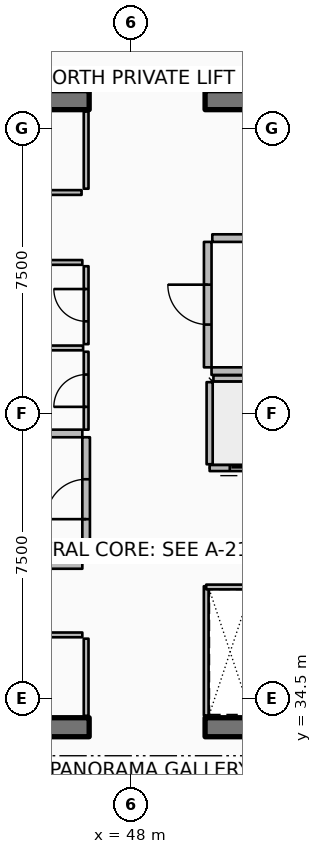
"""IFC4 building model, lengths in metres.
Left out: names, types, materials, properties, quantities, classifications, styles, units other than length and angle.
Written with IfcOpenShell. Run it as: python <this file> out.ifc"""

import sys

from ifc_helpers import new_model, si_unit, direction, frame, frame_2d, origin, place, context, subcontext, project, spatial, rectangle, extrude, element, fill, save


model = new_model("IFC4")
c1 = context("Model", 3, precision=1e-05, world=origin(), true_north=direction((0.0, 1.0)))
c2 = subcontext(c1, "Body", "Model", "MODEL_VIEW")
j1 = project(units=[si_unit("LENGTHUNIT", "METRE"), si_unit("PLANEANGLEUNIT", "RADIAN")], contexts=[c1])
p1 = place(None, origin())
s1 = spatial("IfcSite", under=j1, at=p1, CompositionType="ELEMENT")
p2 = place(p1, origin())
s2 = spatial("IfcBuilding", under=s1, at=p2, CompositionType="ELEMENT")
p3 = place(p2, frame((0.0, 0.0, 317.9)))
s3 = spatial("IfcBuildingStorey", under=s2, at=p3, CompositionType="ELEMENT", Elevation=317.9)
p4 = place(p3, frame((37.3, 33.75, 0.0), z_axis=(0.0, 0.0, 1.0), x_axis=(1.0, 0.0, 0.0)))
e1 = element("IfcWall", 1, at=p4, inside=s3, PredefinedType="SHEAR", context=c2, shape_type="SweptSolid", body=[
    extrude(rectangle(XDim=9.6, YDim=0.5, at=frame_2d((4.8, 0.0))), origin(), (0.0, 0.0, 1.0), 4.2),
])
p5 = place(p3, frame((49.95, 33.75, 0.0), z_axis=(0.0, 0.0, 1.0), x_axis=(1.0, 0.0, 0.0)))
e2 = element("IfcWall", 2, at=p5, inside=s3, PredefinedType="SHEAR", context=c2, shape_type="SweptSolid", body=[
    extrude(rectangle(XDim=9.6, YDim=0.5, at=frame_2d((4.8, 0.0))), origin(), (0.0, 0.0, 1.0), 4.2),
])
p6 = place(p3, frame((37.3, 50.25, 0.0), z_axis=(0.0, 0.0, 1.0), x_axis=(1.0, 0.0, 0.0)))
e3 = element("IfcWall", 3, at=p6, inside=s3, PredefinedType="SHEAR", context=c2, shape_type="SweptSolid", body=[
    extrude(rectangle(XDim=9.6, YDim=0.5, at=frame_2d((4.8, 0.0))), origin(), (0.0, 0.0, 1.0), 4.2),
])
p7 = place(p3, frame((49.95, 50.25, 0.0), z_axis=(0.0, 0.0, 1.0), x_axis=(1.0, 0.0, 0.0)))
e4 = element("IfcWall", 4, at=p7, inside=s3, PredefinedType="SHEAR", context=c2, shape_type="SweptSolid", body=[
    extrude(rectangle(XDim=9.6, YDim=0.5, at=frame_2d((4.8, 0.0))), origin(), (0.0, 0.0, 1.0), 4.2),
])
p8 = place(p3, frame((52.23, 40.57, 0.0), z_axis=(0.0, 0.0, 1.0), x_axis=(-1.0, 0.0, 0.0)))
e5 = element("IfcWall", 5, at=p8, inside=s3, PredefinedType="PARTITIONING", context=c2, shape_type="SweptSolid", body=[
    extrude(rectangle(XDim=2.16, YDim=0.16, at=frame_2d((1.08, 0.0))), origin(), (0.0, 0.0, 1.0), 3.94),
])
p9 = place(p8, frame((0.53, 0.0, 0.0)))
e6 = element("IfcOpeningElement", 6, at=p9, cuts=e5, PredefinedType="OPENING", context=c2, shape_type="SweptSolid", body=[
    extrude(rectangle(XDim=1.1, YDim=2.1, at=frame_2d((0.55, 1.05))), frame((0.0, 0.09, 0.0), z_axis=(0.0, -1.0, 0.0), x_axis=(1.0, 0.0, 0.0)), (0.0, 0.0, 1.0), 0.18),
])
p10 = place(p3, frame((50.07, 40.67, 0.0), z_axis=(0.0, 0.0, 1.0), x_axis=(0.0, 1.0, 0.0)))
e7 = element("IfcWall", 7, at=p10, inside=s3, PredefinedType="PARTITIONING", context=c2, shape_type="SweptSolid", body=[
    extrude(rectangle(XDim=2.16, YDim=0.16, at=frame_2d((1.08, 0.0))), origin(), (0.0, 0.0, 1.0), 3.94),
])
p11 = place(p3, frame((50.17, 42.93, 0.0), z_axis=(0.0, 0.0, 1.0), x_axis=(1.0, 0.0, 0.0)))
e8 = element("IfcWall", 8, at=p11, inside=s3, PredefinedType="PARTITIONING", context=c2, shape_type="SweptSolid", body=[
    extrude(rectangle(XDim=1.96, YDim=0.16, at=frame_2d((0.98, 0.0))), origin(), (0.0, 0.0, 1.0), 3.94),
])
p12 = place(p3, frame((46.82, 34.05, 0.0), z_axis=(0.0, 0.0, 1.0), x_axis=(0.0, 1.0, 0.0)))
e9 = element("IfcWall", 9, at=p12, inside=s3, PredefinedType="PARTITIONING", context=c2, shape_type="SweptSolid", body=[
    extrude(rectangle(XDim=2.03, YDim=0.125, at=frame_2d((1.015, 0.0))), origin(), (0.0, 0.0, 1.0), 3.38),
])
p13 = place(p3, frame((37.92, 36.18, 0.0), z_axis=(0.0, 0.0, 1.0), x_axis=(1.0, 0.0, 0.0)))
e10 = element("IfcWall", 10, at=p13, inside=s3, PredefinedType="PARTITIONING", context=c2, shape_type="SweptSolid", body=[
    extrude(rectangle(XDim=8.8, YDim=0.125, at=frame_2d((4.4, 0.0))), origin(), (0.0, 0.0, 1.0), 3.38),
])
p14 = place(p13, frame((3.975, 0.0, 0.0)))
e11 = element("IfcOpeningElement", 11, at=p14, cuts=e10, PredefinedType="OPENING", context=c2, shape_type="SweptSolid", body=[
    extrude(rectangle(XDim=0.85, YDim=2.06, at=frame_2d((0.425, 1.03))), frame((0.0, 0.073, 0.0), z_axis=(0.0, -1.0, 0.0), x_axis=(1.0, 0.0, 0.0)), (0.0, 0.0, 1.0), 0.145),
])
p15 = place(p3, frame((46.82, 47.92, 0.0), z_axis=(0.0, 0.0, 1.0), x_axis=(0.0, 1.0, 0.0)))
e12 = element("IfcWall", 12, at=p15, inside=s3, PredefinedType="PARTITIONING", context=c2, shape_type="SweptSolid", body=[
    extrude(rectangle(XDim=2.03, YDim=0.125, at=frame_2d((1.015, 0.0))), origin(), (0.0, 0.0, 1.0), 3.38),
])
p16 = place(p3, frame((42.2, 47.82, 0.0), z_axis=(0.0, 0.0, 1.0), x_axis=(1.0, 0.0, 0.0)))
e13 = element("IfcWall", 13, at=p16, inside=s3, PredefinedType="PARTITIONING", context=c2, shape_type="SweptSolid", body=[
    extrude(rectangle(XDim=4.5, YDim=0.125, at=frame_2d((2.25, 0.0))), origin(), (0.0, 0.0, 1.0), 3.38),
])
p17 = place(p16, frame((1.825, 0.0, 0.0)))
e14 = element("IfcOpeningElement", 14, at=p17, cuts=e13, PredefinedType="OPENING", context=c2, shape_type="SweptSolid", body=[
    extrude(rectangle(XDim=0.85, YDim=2.06, at=frame_2d((0.425, 1.03))), frame((0.0, 0.073, 0.0), z_axis=(0.0, -1.0, 0.0), x_axis=(1.0, 0.0, 0.0)), (0.0, 0.0, 1.0), 0.145),
])
p18 = place(p3, frame((41.35, 38.02, 0.0), z_axis=(0.0, 0.0, 1.0), x_axis=(1.0, 0.0, 0.0)))
e15 = element("IfcWall", 15, at=p18, inside=s3, PredefinedType="PARTITIONING", context=c2, shape_type="SweptSolid", body=[
    extrude(rectangle(XDim=5.37, YDim=0.2, at=frame_2d((2.685, 0.0))), origin(), (0.0, 0.0, 1.0), 3.94),
])
p19 = place(p3, frame((43.92, 41.48, 0.0), z_axis=(0.0, 0.0, 1.0), x_axis=(1.0, 0.0, 0.0)))
e16 = element("IfcWall", 16, at=p19, inside=s3, PredefinedType="PARTITIONING", context=c2, shape_type="SweptSolid", body=[
    extrude(rectangle(XDim=2.8, YDim=0.2, at=frame_2d((1.4, 0.0))), origin(), (0.0, 0.0, 1.0), 3.94),
])
p20 = place(p3, frame((46.82, 38.12, 0.0), z_axis=(0.0, 0.0, 1.0), x_axis=(0.0, 1.0, 0.0)))
e17 = element("IfcWall", 17, at=p20, inside=s3, PredefinedType="PARTITIONING", context=c2, shape_type="SweptSolid", body=[
    extrude(rectangle(XDim=3.26, YDim=0.2, at=frame_2d((1.63, 0.0))), origin(), (0.0, 0.0, 1.0), 3.94),
])
p21 = place(p20, frame((1.105, 0.0, 0.0)))
e18 = element("IfcOpeningElement", 18, at=p21, cuts=e17, PredefinedType="OPENING", context=c2, shape_type="SweptSolid", body=[
    extrude(rectangle(XDim=1.05, YDim=2.1, at=frame_2d((0.525, 1.05))), frame((0.0, 0.11, 0.0), z_axis=(0.0, -1.0, 0.0), x_axis=(1.0, 0.0, 0.0)), (0.0, 0.0, 1.0), 0.22),
])
p22 = place(p3, frame((50.12, 43.12, 0.0), z_axis=(0.0, 0.0, 1.0), x_axis=(1.0, 0.0, 0.0)))
e19 = element("IfcWall", 19, at=p22, inside=s3, PredefinedType="PARTITIONING", context=c2, shape_type="SweptSolid", body=[
    extrude(rectangle(XDim=8.88, YDim=0.2, at=frame_2d((4.44, 0.0))), origin(), (0.0, 0.0, 1.0), 3.94),
])
p23 = place(p3, frame((50.14, 46.62, 0.0), z_axis=(0.0, 0.0, 1.0), x_axis=(1.0, 0.0, 0.0)))
e20 = element("IfcWall", 20, at=p23, inside=s3, PredefinedType="PARTITIONING", context=c2, shape_type="SweptSolid", body=[
    extrude(rectangle(XDim=1.02, YDim=0.2, at=frame_2d((0.51, 0.0))), origin(), (0.0, 0.0, 1.0), 3.94),
])
p24 = place(p3, frame((50.02, 43.22, 0.0), z_axis=(0.0, 0.0, 1.0), x_axis=(0.0, 1.0, 0.0)))
e21 = element("IfcWall", 21, at=p24, inside=s3, PredefinedType="PARTITIONING", context=c2, shape_type="SweptSolid", body=[
    extrude(rectangle(XDim=3.3, YDim=0.2, at=frame_2d((1.65, 0.0))), origin(), (0.0, 0.0, 1.0), 3.94),
])
p25 = place(p24, frame((1.125, 0.0, 0.0)))
e22 = element("IfcOpeningElement", 22, at=p25, cuts=e21, PredefinedType="OPENING", context=c2, shape_type="SweptSolid", body=[
    extrude(rectangle(XDim=1.05, YDim=2.1, at=frame_2d((0.525, 1.05))), frame((0.0, 0.11, 0.0), z_axis=(0.0, -1.0, 0.0), x_axis=(1.0, 0.0, 0.0)), (0.0, 0.0, 1.0), 0.22),
])
p26 = place(p3, frame((41.36, 45.98, 0.0), z_axis=(0.0, 0.0, 1.0), x_axis=(1.0, 0.0, 0.0)))
e23 = element("IfcWall", 23, at=p26, inside=s3, PredefinedType="PARTITIONING", context=c2, shape_type="SweptSolid", body=[
    extrude(rectangle(XDim=5.36, YDim=0.125, at=frame_2d((2.68, 0.0))), origin(), (0.0, 0.0, 1.0), 3.38),
])
p27 = place(p3, frame((49.98, 34.06, 0.0), z_axis=(0.0, 0.0, 1.0), x_axis=(0.0, 1.0, 0.0)))
e24 = element("IfcWall", 24, at=p27, inside=s3, PredefinedType="PARTITIONING", context=c2, shape_type="SweptSolid", body=[
    extrude(rectangle(XDim=3.4, YDim=0.125, at=frame_2d((1.7, 0.0))), origin(), (0.0, 0.0, 1.0), 3.38),
])
p28 = place(p3, frame((49.98, 37.44, 0.0), z_axis=(0.0, 0.0, 1.0), x_axis=(1.0, 0.0, 0.0)))
e25 = element("IfcWall", 25, at=p28, inside=s3, PredefinedType="PARTITIONING", context=c2, shape_type="SweptSolid", body=[
    extrude(rectangle(XDim=1.26, YDim=0.125, at=frame_2d((0.63, 0.0))), origin(), (0.0, 0.0, 1.0), 3.38),
])
p29 = place(p3, frame((44.03, 43.73, 0.0), z_axis=(0.0, 0.0, 1.0), x_axis=(1.0, 0.0, 0.0)))
e26 = element("IfcWall", 26, at=p29, inside=s3, PredefinedType="PARTITIONING", context=c2, shape_type="SweptSolid", body=[
    extrude(rectangle(XDim=2.71, YDim=0.125, at=frame_2d((1.355, 0.0))), origin(), (0.0, 0.0, 1.0), 3.38),
])
p30 = place(p3, frame((46.82, 41.58, 0.0), z_axis=(0.0, 0.0, 1.0), x_axis=(0.0, 1.0, 0.0)))
e27 = element("IfcWall", 27, at=p30, inside=s3, PredefinedType="PARTITIONING", context=c2, shape_type="SweptSolid", body=[
    extrude(rectangle(XDim=2.05, YDim=0.125, at=frame_2d((1.025, 0.0))), origin(), (0.0, 0.0, 1.0), 3.38),
])
p31 = place(p30, frame((0.6, 0.0, 0.0)))
e28 = element("IfcOpeningElement", 28, at=p31, cuts=e27, PredefinedType="OPENING", context=c2, shape_type="SweptSolid", body=[
    extrude(rectangle(XDim=0.85, YDim=2.06, at=frame_2d((0.425, 1.03))), frame((0.0, 0.073, 0.0), z_axis=(0.0, -1.0, 0.0), x_axis=(1.0, 0.0, 0.0)), (0.0, 0.0, 1.0), 0.145),
])
p32 = place(p3, frame((46.82, 43.83, 0.0), z_axis=(0.0, 0.0, 1.0), x_axis=(0.0, 1.0, 0.0)))
e29 = element("IfcWall", 29, at=p32, inside=s3, PredefinedType="PARTITIONING", context=c2, shape_type="SweptSolid", body=[
    extrude(rectangle(XDim=2.05, YDim=0.125, at=frame_2d((1.025, 0.0))), origin(), (0.0, 0.0, 1.0), 3.38),
])
p33 = place(p32, frame((0.6, 0.0, 0.0)))
e30 = element("IfcOpeningElement", 30, at=p33, cuts=e29, PredefinedType="OPENING", context=c2, shape_type="SweptSolid", body=[
    extrude(rectangle(XDim=0.85, YDim=2.06, at=frame_2d((0.425, 1.03))), frame((0.0, 0.073, 0.0), z_axis=(0.0, -1.0, 0.0), x_axis=(1.0, 0.0, 0.0)), (0.0, 0.0, 1.0), 0.145),
])
p34 = place(p9, origin())
e31 = element("IfcDoor", 31, at=p34, inside=s3, OperationType="DOUBLE_DOOR_SLIDING", PredefinedType="DOOR", context=c2, shape_type="SweptSolid", body=[
    extrude(rectangle(XDim=1.1, YDim=2.1, at=frame_2d((0.55, 1.05))), frame((0.0, 0.025, 0.0), z_axis=(0.0, -1.0, 0.0), x_axis=(1.0, 0.0, 0.0)), (0.0, 0.0, 1.0), 0.05),
])
fill(e6, e31)
p35 = place(p21, origin())
e32 = element("IfcDoor", 32, at=p35, inside=s3, OperationType="SINGLE_SWING_LEFT", PredefinedType="DOOR", context=c2, shape_type="SweptSolid", body=[
    extrude(rectangle(XDim=1.05, YDim=2.1, at=frame_2d((0.525, 1.05))), frame((0.0, 0.025, 0.0), z_axis=(0.0, -1.0, 0.0), x_axis=(1.0, 0.0, 0.0)), (0.0, 0.0, 1.0), 0.05),
])
fill(e18, e32)
p36 = place(p25, origin())
e33 = element("IfcDoor", 33, at=p36, inside=s3, OperationType="SINGLE_SWING_RIGHT", PredefinedType="DOOR", context=c2, shape_type="SweptSolid", body=[
    extrude(rectangle(XDim=1.05, YDim=2.1, at=frame_2d((0.525, 1.05))), frame((0.0, 0.025, 0.0), z_axis=(0.0, -1.0, 0.0), x_axis=(1.0, 0.0, 0.0)), (0.0, 0.0, 1.0), 0.05),
])
fill(e22, e33)
p37 = place(p31, origin())
e34 = element("IfcDoor", 34, at=p37, inside=s3, OperationType="SINGLE_SWING_LEFT", PredefinedType="DOOR", context=c2, shape_type="SweptSolid", body=[
    extrude(rectangle(XDim=0.85, YDim=2.06, at=frame_2d((0.425, 1.03))), frame((0.0, 0.025, 0.0), z_axis=(0.0, -1.0, 0.0), x_axis=(1.0, 0.0, 0.0)), (0.0, 0.0, 1.0), 0.05),
])
fill(e28, e34)
p38 = place(p33, origin())
e35 = element("IfcDoor", 35, at=p38, inside=s3, OperationType="SINGLE_SWING_RIGHT", PredefinedType="DOOR", context=c2, shape_type="SweptSolid", body=[
    extrude(rectangle(XDim=0.85, YDim=2.06, at=frame_2d((0.425, 1.03))), frame((0.0, 0.025, 0.0), z_axis=(0.0, -1.0, 0.0), x_axis=(1.0, 0.0, 0.0)), (0.0, 0.0, 1.0), 0.05),
])
fill(e30, e35)
save(model, sys.argv[1])
